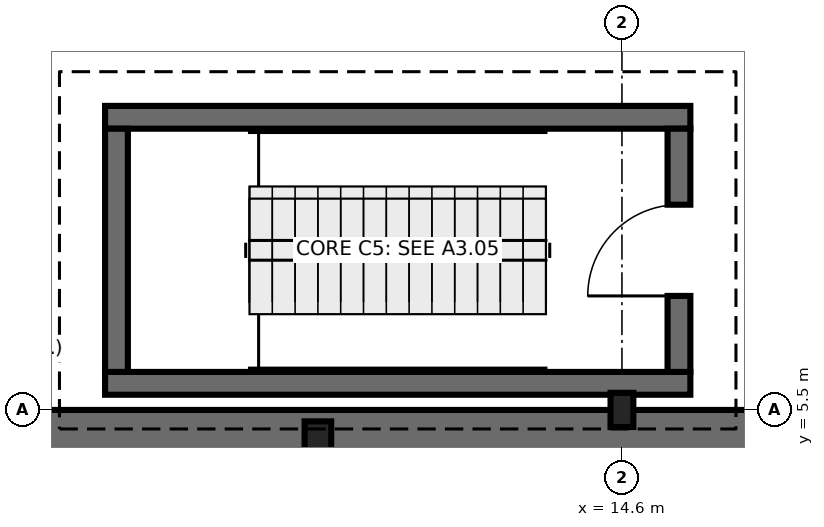
"""IFC4 building model, lengths in metres.
Left out: names, types, materials, properties, quantities, classifications, styles, units other than length and angle.
Written with IfcOpenShell. Run it as: python <this file> out.ifc"""

import sys

from ifc_helpers import new_model, si_unit, direction, frame, frame_2d, origin, origin_2d, place, context, subcontext, project, spatial, rectangle, i_section, extrude, element, fill, save


model = new_model("IFC4")
c1 = context("Model", 3, precision=1e-05, world=origin(), true_north=direction((0.0, 1.0)))
c2 = subcontext(c1, "Body", "Model", "MODEL_VIEW")
j1 = project(units=[si_unit("LENGTHUNIT", "METRE"), si_unit("PLANEANGLEUNIT", "RADIAN")], contexts=[c1])
p1 = place(None, origin())
s1 = spatial("IfcSite", under=j1, at=p1, CompositionType="ELEMENT")
p2 = place(p1, origin())
s2 = spatial("IfcBuilding", under=s1, at=p2, CompositionType="ELEMENT")
p3 = place(p2, frame((0.0, 0.0, -5.0)))
s3 = spatial("IfcBuildingStorey", under=s2, at=p3, CompositionType="ELEMENT", Elevation=-5.0)
p4 = place(p3, frame((10.6, 5.05, 0.0), z_axis=(0.0, 0.0, 1.0), x_axis=(1.0, 0.0, 0.0)))
e1 = element("IfcColumn", 1, at=p4, inside=s3, PredefinedType="PILASTER", context=c2, shape_type="SweptSolid", body=[
    extrude(rectangle(XDim=0.35, YDim=0.6, at=origin_2d()), origin(), (0.0, 0.0, 1.0), 5.0),
])
p5 = place(p3, frame((14.6, 5.5, 0.0), z_axis=(0.0, 0.0, 1.0), x_axis=(1.0, 0.0, 0.0)))
e2 = element("IfcColumn", 2, at=p5, inside=s3, PredefinedType="COLUMN", context=c2, shape_type="SweptSolid", body=[
    extrude(i_section(OverallWidth=0.3, OverallDepth=0.45, WebThickness=0.014, FlangeThickness=0.026, FilletRadius=0.027, at=origin_2d()), origin(), (0.0, 0.0, 1.0), 5.0),
])
for number, where, z_axis, x_axis in (
    (3, (7.8, 5.85, 0.0), (0.0, 0.0, 1.0), (1.0, 0.0, 0.0)),
    (4, (15.5, 9.35, 0.0), (0.0, 0.0, 1.0), (-1.0, 0.0, 0.0)),
):
    element("IfcWall", number, at=place(p3, frame(where, z_axis=z_axis, x_axis=x_axis)), inside=s3, PredefinedType="SHEAR", context=c2, shape_type="SweptSolid", body=[
        extrude(rectangle(XDim=7.7, YDim=0.3, at=frame_2d((3.85, 0.0))), origin(), (0.0, 0.0, 1.0), 5.0),
    ])
p6 = place(p3, frame((7.95, 9.2, 0.0), z_axis=(0.0, 0.0, 1.0), x_axis=(0.0, -1.0, 0.0)))
e5 = element("IfcWall", 5, at=p6, inside=s3, PredefinedType="SHEAR", context=c2, shape_type="SweptSolid", body=[
    extrude(rectangle(XDim=3.2, YDim=0.3, at=frame_2d((1.6, 0.0))), origin(), (0.0, 0.0, 1.0), 5.0),
])
p7 = place(p3, frame((15.35, 6.0, 0.0), z_axis=(0.0, 0.0, 1.0), x_axis=(0.0, 1.0, 0.0)))
e6 = element("IfcWall", 6, at=p7, inside=s3, PredefinedType="SHEAR", context=c2, shape_type="SweptSolid", body=[
    extrude(rectangle(XDim=3.2, YDim=0.3, at=frame_2d((1.6, 0.0))), origin(), (0.0, 0.0, 1.0), 5.0),
])
p8 = place(p7, frame((1.0, 0.0, 0.0)))
e7 = element("IfcOpeningElement", 7, at=p8, cuts=e6, PredefinedType="OPENING", context=c2, shape_type="SweptSolid", body=[
    extrude(rectangle(XDim=1.2, YDim=2.15, at=frame_2d((0.6, 1.075))), frame((0.0, 0.16, 0.0), z_axis=(0.0, -1.0, 0.0), x_axis=(1.0, 0.0, 0.0)), (0.0, 0.0, 1.0), 0.32),
])
p9 = place(p3, frame((6.182, 5.2, 0.0), z_axis=(0.0, 0.0, 1.0), x_axis=(1.0, 0.0, 0.0)))
e8 = element("IfcWall", 8, at=p9, inside=s3, PredefinedType="SHEAR", context=c2, shape_type="SweptSolid", body=[
    extrude(rectangle(XDim=47.736, YDim=0.6, at=frame_2d((23.868, 0.0))), origin(), (0.0, 0.0, 1.0), 4.7),
])
p10 = place(p8, origin())
e9 = element("IfcDoor", 9, at=p10, inside=s3, OperationType="SINGLE_SWING_LEFT", PredefinedType="DOOR", context=c2, shape_type="SweptSolid", body=[
    extrude(rectangle(XDim=1.2, YDim=2.15, at=frame_2d((0.6, 1.075))), frame((0.0, 0.025, 0.0), z_axis=(0.0, -1.0, 0.0), x_axis=(1.0, 0.0, 0.0)), (0.0, 0.0, 1.0), 0.05),
])
fill(e7, e9)
save(model, sys.argv[1])
